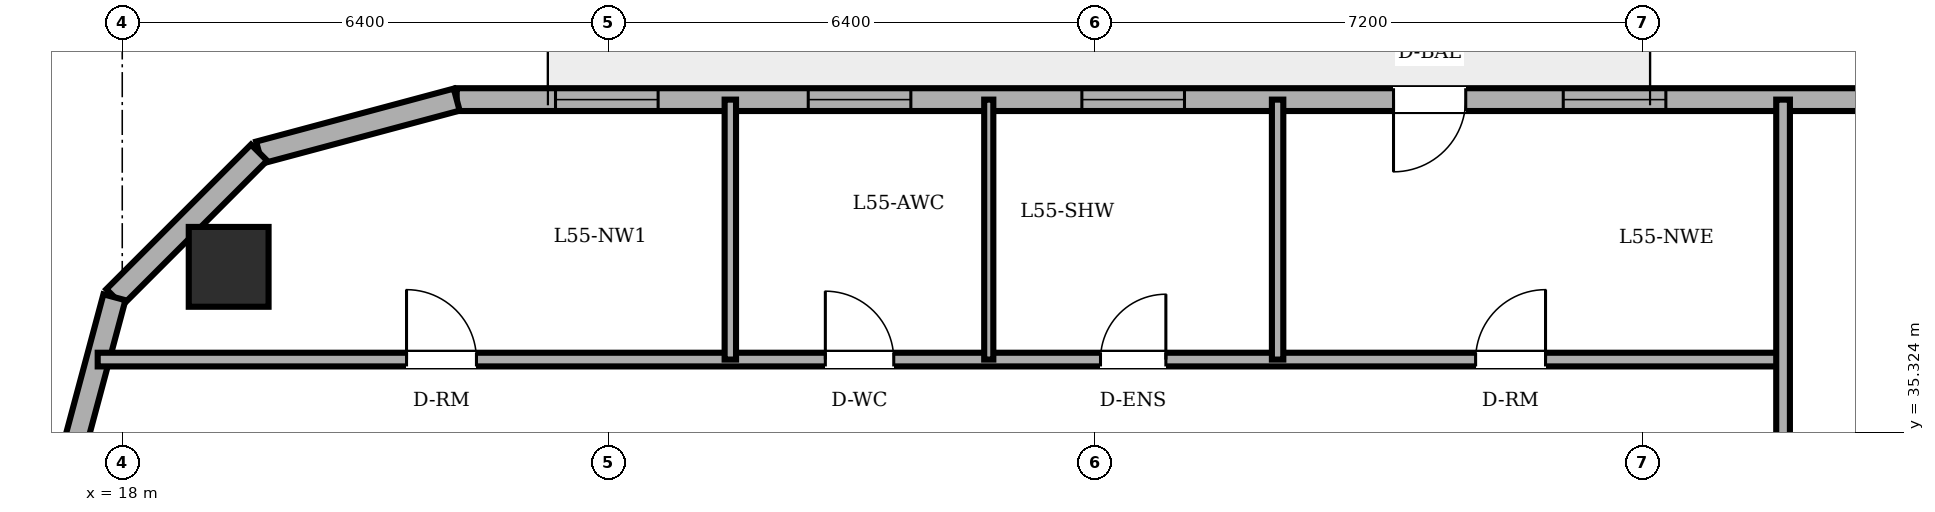
"""IFC4 building model, lengths in metres.
Left out: names, types, materials, properties, quantities, classifications, styles, units other than length and angle.
Written with IfcOpenShell. Run it as: python <this file> out.ifc"""

import sys

from ifc_helpers import new_model, si_unit, direction, frame, frame_2d, origin, origin_2d, place, context, subcontext, project, spatial, rectangle, circle, extrude, element, fill, save


model = new_model("IFC4")
c1 = context("Model", 3, precision=1e-05, world=origin(), true_north=direction((0.0, 1.0)))
c2 = subcontext(c1, "Body", "Model", "MODEL_VIEW")
j1 = project(units=[si_unit("LENGTHUNIT", "METRE"), si_unit("PLANEANGLEUNIT", "RADIAN")], contexts=[c1])
p1 = place(None, origin())
s1 = spatial("IfcSite", under=j1, at=p1, CompositionType="ELEMENT")
p2 = place(p1, origin())
s2 = spatial("IfcBuilding", under=s1, at=p2, CompositionType="ELEMENT")
p3 = place(p2, frame((0.0, 0.0, 212.1)))
s3 = spatial("IfcBuildingStorey", under=s2, at=p3, CompositionType="ELEMENT", Elevation=212.1)
p4 = place(p3, frame((19.4, 37.5, 0.0), z_axis=(0.0, 0.0, 1.0), x_axis=(1.0, 0.0, 0.0)))
e1 = element("IfcColumn", 1, at=p4, inside=s3, PredefinedType="COLUMN", context=c2, shape_type="SweptSolid", body=[
    extrude(circle(Radius=0.525, at=origin_2d()), origin(), (0.0, 0.0, 1.0), 3.6),
])
p5 = place(p3, frame((54.885, 39.7, 0.0), z_axis=(0.0, 0.0, 1.0), x_axis=(-1.0, 0.0, 0.0)))
e2 = element("IfcWall", 2, at=p5, inside=s3, PredefinedType="SOLIDWALL", context=c2, shape_type="SweptSolid", body=[
    extrude(rectangle(XDim=32.485, YDim=0.3, at=frame_2d((16.243, 0.0))), origin(), (0.0, 0.0, 1.0), 3.4),
])
p6 = place(p5, frame((19.21, 0.0, 0.0)))
e3 = element("IfcOpeningElement", 3, at=p6, cuts=e2, PredefinedType="OPENING", context=c2, shape_type="SweptSolid", body=[
    extrude(rectangle(XDim=0.95, YDim=2.2, at=frame_2d((0.475, 1.1))), frame((0.0, 0.16, 0.0), z_axis=(0.0, -1.0, 0.0), x_axis=(1.0, 0.0, 0.0)), (0.0, 0.0, 1.0), 0.32),
])
p7 = place(p5, frame((5.846, 0.0, 0.85)))
e4 = element("IfcOpeningElement", 4, at=p7, cuts=e2, PredefinedType="OPENING", context=c2, shape_type="SweptSolid", body=[
    extrude(rectangle(XDim=1.35, YDim=1.55, at=frame_2d((0.675, 0.775))), frame((0.0, 0.16, 0.0), z_axis=(0.0, -1.0, 0.0), x_axis=(1.0, 0.0, 0.0)), (0.0, 0.0, 1.0), 0.32),
])
p8 = place(p5, frame((10.103, 0.0, 0.85)))
e5 = element("IfcOpeningElement", 5, at=p8, cuts=e2, PredefinedType="OPENING", context=c2, shape_type="SweptSolid", body=[
    extrude(rectangle(XDim=1.35, YDim=1.55, at=frame_2d((0.675, 0.775))), frame((0.0, 0.16, 0.0), z_axis=(0.0, -1.0, 0.0), x_axis=(1.0, 0.0, 0.0)), (0.0, 0.0, 1.0), 0.32),
])
p9 = place(p5, frame((16.577, 0.0, 0.85)))
e6 = element("IfcOpeningElement", 6, at=p9, cuts=e2, PredefinedType="OPENING", context=c2, shape_type="SweptSolid", body=[
    extrude(rectangle(XDim=1.35, YDim=1.55, at=frame_2d((0.675, 0.775))), frame((0.0, 0.16, 0.0), z_axis=(0.0, -1.0, 0.0), x_axis=(1.0, 0.0, 0.0)), (0.0, 0.0, 1.0), 0.32),
])
p10 = place(p5, frame((22.91, 0.0, 0.85)))
e7 = element("IfcOpeningElement", 7, at=p10, cuts=e2, PredefinedType="OPENING", context=c2, shape_type="SweptSolid", body=[
    extrude(rectangle(XDim=1.35, YDim=1.55, at=frame_2d((0.675, 0.775))), frame((0.0, 0.16, 0.0), z_axis=(0.0, -1.0, 0.0), x_axis=(1.0, 0.0, 0.0)), (0.0, 0.0, 1.0), 0.32),
])
p11 = place(p5, frame((26.51, 0.0, 0.85)))
e8 = element("IfcOpeningElement", 8, at=p11, cuts=e2, PredefinedType="OPENING", context=c2, shape_type="SweptSolid", body=[
    extrude(rectangle(XDim=1.35, YDim=1.55, at=frame_2d((0.675, 0.775))), frame((0.0, 0.16, 0.0), z_axis=(0.0, -1.0, 0.0), x_axis=(1.0, 0.0, 0.0)), (0.0, 0.0, 1.0), 0.32),
])
p12 = place(p5, frame((29.835, 0.0, 0.85)))
e9 = element("IfcOpeningElement", 9, at=p12, cuts=e2, PredefinedType="OPENING", context=c2, shape_type="SweptSolid", body=[
    extrude(rectangle(XDim=1.35, YDim=1.55, at=frame_2d((0.675, 0.775))), frame((0.0, 0.16, 0.0), z_axis=(0.0, -1.0, 0.0), x_axis=(1.0, 0.0, 0.0)), (0.0, 0.0, 1.0), 0.32),
])
p13 = place(p3, frame((22.4, 39.7, 0.0), z_axis=(0.0, 0.0, 1.0), x_axis=(-0.965889330541, -0.258955210695, 0.0)))
e10 = element("IfcWall", 10, at=p13, inside=s3, PredefinedType="SOLIDWALL", context=c2, shape_type="SweptSolid", body=[
    extrude(rectangle(XDim=2.692, YDim=0.3, at=frame_2d((1.346, 0.0))), origin(), (0.0, 0.0, 1.0), 3.4),
])
p14 = place(p3, frame((19.8, 39.003, 0.0), z_axis=(0.0, 0.0, 1.0), x_axis=(-0.707152139074, -0.70706142039, 0.0)))
e11 = element("IfcWall", 11, at=p14, inside=s3, PredefinedType="SOLIDWALL", context=c2, shape_type="SweptSolid", body=[
    extrude(rectangle(XDim=2.691, YDim=0.3, at=frame_2d((1.346, 0.0))), origin(), (0.0, 0.0, 1.0), 3.4),
])
p15 = place(p3, frame((17.897, 37.1, 0.0), z_axis=(0.0, 0.0, 1.0), x_axis=(-0.258932525951, -0.965895412042, 0.0)))
e12 = element("IfcWall", 12, at=p15, inside=s3, PredefinedType="SOLIDWALL", context=c2, shape_type="SweptSolid", body=[
    extrude(rectangle(XDim=2.692, YDim=0.3, at=frame_2d((1.346, 0.0))), origin(), (0.0, 0.0, 1.0), 3.4),
])
p16 = place(p3, frame((17.677, 36.28, 0.0), z_axis=(0.0, 0.0, 1.0), x_axis=(1.0, 0.0, 0.0)))
e13 = element("IfcWall", 13, at=p16, inside=s3, PredefinedType="PARTITIONING", context=c2, shape_type="SweptSolid", body=[
    extrude(rectangle(XDim=22.173, YDim=0.18, at=frame_2d((11.086, 0.0))), origin(), (0.0, 0.0, 1.0), 3.4),
])
p17 = place(p16, frame((9.573, 0.0, 0.0)))
e14 = element("IfcOpeningElement", 14, at=p17, cuts=e13, PredefinedType="OPENING", context=c2, shape_type="SweptSolid", body=[
    extrude(rectangle(XDim=0.9, YDim=2.1, at=frame_2d((0.45, 1.05))), frame((0.0, 0.1, 0.0), z_axis=(0.0, -1.0, 0.0), x_axis=(1.0, 0.0, 0.0)), (0.0, 0.0, 1.0), 0.2),
])
p18 = place(p16, frame((13.193, 0.0, 0.0)))
e15 = element("IfcOpeningElement", 15, at=p18, cuts=e13, PredefinedType="OPENING", context=c2, shape_type="SweptSolid", body=[
    extrude(rectangle(XDim=0.86, YDim=2.1, at=frame_2d((0.43, 1.05))), frame((0.0, 0.1, 0.0), z_axis=(0.0, -1.0, 0.0), x_axis=(1.0, 0.0, 0.0)), (0.0, 0.0, 1.0), 0.2),
])
p19 = place(p16, frame((4.063, 0.0, 0.0)))
e16 = element("IfcOpeningElement", 16, at=p19, cuts=e13, PredefinedType="OPENING", context=c2, shape_type="SweptSolid", body=[
    extrude(rectangle(XDim=0.92, YDim=2.1, at=frame_2d((0.46, 1.05))), frame((0.0, 0.1, 0.0), z_axis=(0.0, -1.0, 0.0), x_axis=(1.0, 0.0, 0.0)), (0.0, 0.0, 1.0), 0.2),
])
p20 = place(p16, frame((18.128, 0.0, 0.0)))
e17 = element("IfcOpeningElement", 17, at=p20, cuts=e13, PredefinedType="OPENING", context=c2, shape_type="SweptSolid", body=[
    extrude(rectangle(XDim=0.92, YDim=2.1, at=frame_2d((0.46, 1.05))), frame((0.0, 0.1, 0.0), z_axis=(0.0, -1.0, 0.0), x_axis=(1.0, 0.0, 0.0)), (0.0, 0.0, 1.0), 0.2),
])
p21 = place(p3, frame((26.0, 36.28, 0.0), z_axis=(0.0, 0.0, 1.0), x_axis=(0.0, 1.0, 0.0)))
e18 = element("IfcWall", 18, at=p21, inside=s3, PredefinedType="PARTITIONING", context=c2, shape_type="SweptSolid", body=[
    extrude(rectangle(XDim=3.42, YDim=0.15, at=frame_2d((1.71, 0.0))), origin(), (0.0, 0.0, 1.0), 3.4),
])
p22 = place(p3, frame((29.4, 36.28, 0.0), z_axis=(0.0, 0.0, 1.0), x_axis=(0.0, 1.0, 0.0)))
e19 = element("IfcWall", 19, at=p22, inside=s3, PredefinedType="PARTITIONING", context=c2, shape_type="SweptSolid", body=[
    extrude(rectangle(XDim=3.42, YDim=0.12, at=frame_2d((1.71, 0.0))), origin(), (0.0, 0.0, 1.0), 3.4),
])
p23 = place(p3, frame((33.2, 36.28, 0.0), z_axis=(0.0, 0.0, 1.0), x_axis=(0.0, 1.0, 0.0)))
e20 = element("IfcWall", 20, at=p23, inside=s3, PredefinedType="PARTITIONING", context=c2, shape_type="SweptSolid", body=[
    extrude(rectangle(XDim=3.42, YDim=0.15, at=frame_2d((1.71, 0.0))), origin(), (0.0, 0.0, 1.0), 3.4),
])
p24 = place(p3, frame((39.85, 25.18, 0.0), z_axis=(0.0, 0.0, 1.0), x_axis=(0.0, 1.0, 0.0)))
e21 = element("IfcWall", 21, at=p24, inside=s3, PredefinedType="PARTITIONING", context=c2, shape_type="SweptSolid", body=[
    extrude(rectangle(XDim=14.52, YDim=0.18, at=frame_2d((7.26, 0.0))), origin(), (0.0, 0.0, 1.0), 3.4),
])
p25 = place(p6, origin())
e22 = element("IfcDoor", 22, at=p25, inside=s3, OperationType="SINGLE_SWING_RIGHT", PredefinedType="DOOR", context=c2, shape_type="SweptSolid", body=[
    extrude(rectangle(XDim=0.95, YDim=2.2, at=frame_2d((0.475, 1.1))), frame((0.0, 0.025, 0.0), z_axis=(0.0, -1.0, 0.0), x_axis=(1.0, 0.0, 0.0)), (0.0, 0.0, 1.0), 0.05),
])
fill(e3, e22)
p26 = place(p9, origin())
e23 = element("IfcWindow", 23, at=p26, inside=s3, PartitioningType="SINGLE_PANEL", PredefinedType="WINDOW", context=c2, shape_type="SweptSolid", body=[
    extrude(rectangle(XDim=1.35, YDim=1.55, at=frame_2d((0.675, 0.775))), frame((0.0, 0.03, 0.0), z_axis=(0.0, -1.0, 0.0), x_axis=(1.0, 0.0, 0.0)), (0.0, 0.0, 1.0), 0.06),
])
fill(e6, e23)
p27 = place(p10, origin())
e24 = element("IfcWindow", 24, at=p27, inside=s3, PartitioningType="SINGLE_PANEL", PredefinedType="WINDOW", context=c2, shape_type="SweptSolid", body=[
    extrude(rectangle(XDim=1.35, YDim=1.55, at=frame_2d((0.675, 0.775))), frame((0.0, 0.03, 0.0), z_axis=(0.0, -1.0, 0.0), x_axis=(1.0, 0.0, 0.0)), (0.0, 0.0, 1.0), 0.06),
])
fill(e7, e24)
p28 = place(p11, origin())
e25 = element("IfcWindow", 25, at=p28, inside=s3, PartitioningType="SINGLE_PANEL", PredefinedType="WINDOW", context=c2, shape_type="SweptSolid", body=[
    extrude(rectangle(XDim=1.35, YDim=1.55, at=frame_2d((0.675, 0.775))), frame((0.0, 0.03, 0.0), z_axis=(0.0, -1.0, 0.0), x_axis=(1.0, 0.0, 0.0)), (0.0, 0.0, 1.0), 0.06),
])
fill(e8, e25)
p29 = place(p12, origin())
e26 = element("IfcWindow", 26, at=p29, inside=s3, PartitioningType="SINGLE_PANEL", PredefinedType="WINDOW", context=c2, shape_type="SweptSolid", body=[
    extrude(rectangle(XDim=1.35, YDim=1.55, at=frame_2d((0.675, 0.775))), frame((0.0, 0.03, 0.0), z_axis=(0.0, -1.0, 0.0), x_axis=(1.0, 0.0, 0.0)), (0.0, 0.0, 1.0), 0.06),
])
fill(e9, e26)
p30 = place(p17, origin())
e27 = element("IfcDoor", 27, at=p30, inside=s3, OperationType="SINGLE_SWING_LEFT", PredefinedType="DOOR", context=c2, shape_type="SweptSolid", body=[
    extrude(rectangle(XDim=0.9, YDim=2.1, at=frame_2d((0.45, 1.05))), frame((0.0, 0.025, 0.0), z_axis=(0.0, -1.0, 0.0), x_axis=(1.0, 0.0, 0.0)), (0.0, 0.0, 1.0), 0.05),
])
fill(e14, e27)
p31 = place(p18, origin())
e28 = element("IfcDoor", 28, at=p31, inside=s3, OperationType="SINGLE_SWING_RIGHT", PredefinedType="DOOR", context=c2, shape_type="SweptSolid", body=[
    extrude(rectangle(XDim=0.86, YDim=2.1, at=frame_2d((0.43, 1.05))), frame((0.0, 0.025, 0.0), z_axis=(0.0, -1.0, 0.0), x_axis=(1.0, 0.0, 0.0)), (0.0, 0.0, 1.0), 0.05),
])
fill(e15, e28)
p32 = place(p19, origin())
e29 = element("IfcDoor", 29, at=p32, inside=s3, OperationType="SINGLE_SWING_LEFT", PredefinedType="DOOR", context=c2, shape_type="SweptSolid", body=[
    extrude(rectangle(XDim=0.92, YDim=2.1, at=frame_2d((0.46, 1.05))), frame((0.0, 0.025, 0.0), z_axis=(0.0, -1.0, 0.0), x_axis=(1.0, 0.0, 0.0)), (0.0, 0.0, 1.0), 0.05),
])
fill(e16, e29)
p33 = place(p20, origin())
e30 = element("IfcDoor", 30, at=p33, inside=s3, OperationType="SINGLE_SWING_RIGHT", PredefinedType="DOOR", context=c2, shape_type="SweptSolid", body=[
    extrude(rectangle(XDim=0.92, YDim=2.1, at=frame_2d((0.46, 1.05))), frame((0.0, 0.025, 0.0), z_axis=(0.0, -1.0, 0.0), x_axis=(1.0, 0.0, 0.0)), (0.0, 0.0, 1.0), 0.05),
])
fill(e17, e30)
save(model, sys.argv[1])
